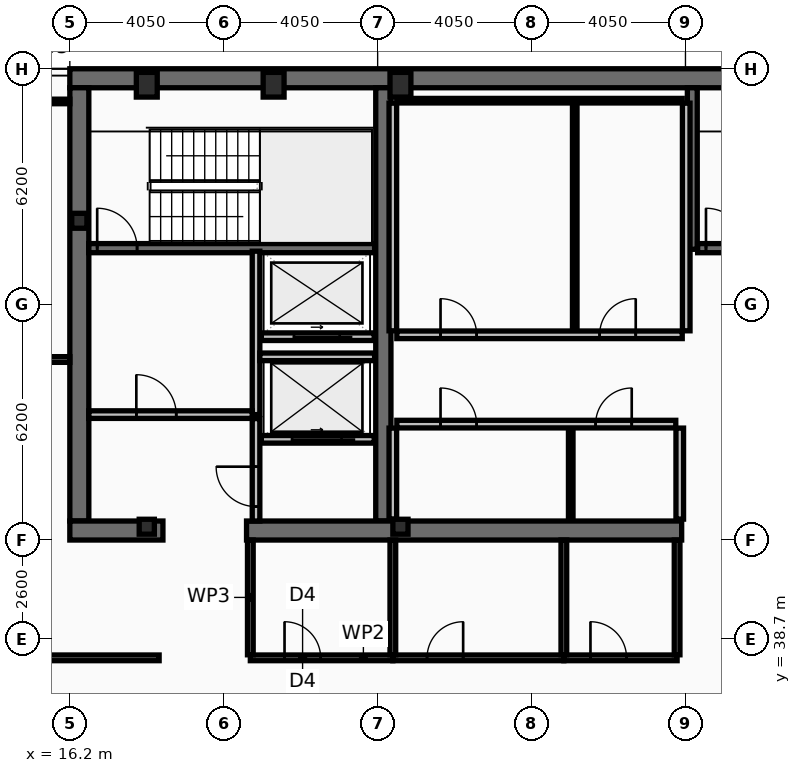
"""IFC4 building model, lengths in metres.
Left out: names, types, materials, properties, quantities, classifications, styles, units other than length and angle.
Written with IfcOpenShell. Run it as: python <this file> out.ifc"""

import sys

from ifc_helpers import new_model, si_unit, direction, frame, frame_2d, origin, origin_2d, place, context, subcontext, project, spatial, rectangle, hollow_rectangle, i_section, extrude, element, fill, save


model = new_model("IFC4")
c1 = context("Model", 3, precision=1e-05, world=origin(), true_north=direction((0.0, 1.0)))
c2 = subcontext(c1, "Body", "Model", "MODEL_VIEW")
j1 = project(units=[si_unit("LENGTHUNIT", "METRE"), si_unit("PLANEANGLEUNIT", "RADIAN")], contexts=[c1])
p1 = place(None, origin())
s1 = spatial("IfcSite", under=j1, at=p1, CompositionType="ELEMENT")
p2 = place(p1, origin())
s2 = spatial("IfcBuilding", under=s1, at=p2, CompositionType="ELEMENT")
p3 = place(p2, frame((0.0, 0.0, 343.4)))
s3 = spatial("IfcBuildingStorey", under=s2, at=p3, CompositionType="ELEMENT", Elevation=343.4)
p4 = place(p3, frame((16.2, 53.45, 0.0), z_axis=(0.0, 0.0, 1.0), x_axis=(1.0, 0.0, 0.0)))
e1 = element("IfcWall", 1, at=p4, inside=s3, PredefinedType="SHEAR", context=c2, shape_type="SweptSolid", body=[
    extrude(rectangle(XDim=40.5, YDim=0.5, at=frame_2d((20.25, 0.0))), origin(), (0.0, 0.0, 1.0), 3.44),
])
p5 = place(p3, frame((16.45, 41.8, 0.0), z_axis=(0.0, 0.0, 1.0), x_axis=(0.0, 1.0, 0.0)))
e2 = element("IfcWall", 2, at=p5, inside=s3, PredefinedType="SHEAR", context=c2, shape_type="SweptSolid", body=[
    extrude(rectangle(XDim=11.4, YDim=0.5, at=frame_2d((5.7, 0.0))), origin(), (0.0, 0.0, 1.0), 3.44),
])
p6 = place(p3, frame((24.45, 41.8, 0.0), z_axis=(0.0, 0.0, 1.0), x_axis=(0.0, 1.0, 0.0)))
e3 = element("IfcWall", 3, at=p6, inside=s3, PredefinedType="SHEAR", context=c2, shape_type="SweptSolid", body=[
    extrude(rectangle(XDim=11.4, YDim=0.4, at=frame_2d((5.7, 0.0))), origin(), (0.0, 0.0, 1.0), 3.44),
])
p7 = place(p3, frame((18.65, 41.55, 0.0), z_axis=(0.0, 0.0, 1.0), x_axis=(-1.0, 0.0, 0.0)))
e4 = element("IfcWall", 4, at=p7, inside=s3, PredefinedType="SHEAR", context=c2, shape_type="SweptSolid", body=[
    extrude(rectangle(XDim=2.45, YDim=0.5, at=frame_2d((1.225, 0.0))), origin(), (0.0, 0.0, 1.0), 3.44),
])
p8 = place(p3, frame((32.3, 41.55, 0.0), z_axis=(0.0, 0.0, 1.0), x_axis=(-1.0, 0.0, 0.0)))
e5 = element("IfcWall", 5, at=p8, inside=s3, PredefinedType="SHEAR", context=c2, shape_type="SweptSolid", body=[
    extrude(rectangle(XDim=11.45, YDim=0.5, at=frame_2d((5.725, 0.0))), origin(), (0.0, 0.0, 1.0), 3.44),
])
p9 = place(p3, frame((32.58, 48.95, 0.0), z_axis=(0.0, 0.0, 1.0), x_axis=(0.0, 1.0, 0.0)))
e6 = element("IfcWall", 6, at=p9, inside=s3, PredefinedType="SHEAR", context=c2, shape_type="SweptSolid", body=[
    extrude(rectangle(XDim=4.25, YDim=0.26, at=frame_2d((2.125, 0.0))), origin(), (0.0, 0.0, 1.0), 3.44),
])
p10 = place(p3, frame((16.7, 48.98, 0.0), z_axis=(0.0, 0.0, 1.0), x_axis=(1.0, 0.0, 0.0)))
e7 = element("IfcWall", 7, at=p10, inside=s3, PredefinedType="SHEAR", context=c2, shape_type="SweptSolid", body=[
    extrude(rectangle(XDim=7.52, YDim=0.24, at=frame_2d((3.76, 0.0))), origin(), (0.0, 0.0, 1.0), 3.44),
])
p11 = place(p10, frame((0.22, 0.0, 0.0)))
e8 = element("IfcOpeningElement", 8, at=p11, cuts=e7, PredefinedType="OPENING", context=c2, shape_type="SweptSolid", body=[
    extrude(rectangle(XDim=1.05, YDim=2.15, at=frame_2d((0.525, 1.075))), frame((0.0, 0.13, 0.0), z_axis=(0.0, -1.0, 0.0), x_axis=(1.0, 0.0, 0.0)), (0.0, 0.0, 1.0), 0.26),
])
p12 = place(p3, frame((32.72, 48.98, 0.0), z_axis=(0.0, 0.0, 1.0), x_axis=(1.0, 0.0, 0.0)))
e9 = element("IfcWall", 9, at=p12, inside=s3, PredefinedType="SHEAR", context=c2, shape_type="SweptSolid", body=[
    extrude(rectangle(XDim=7.56, YDim=0.24, at=frame_2d((3.78, 0.0))), origin(), (0.0, 0.0, 1.0), 3.44),
])
p13 = place(p12, frame((0.22, 0.0, 0.0)))
e10 = element("IfcOpeningElement", 10, at=p13, cuts=e9, PredefinedType="OPENING", context=c2, shape_type="SweptSolid", body=[
    extrude(rectangle(XDim=1.05, YDim=2.15, at=frame_2d((0.525, 1.075))), frame((0.0, 0.13, 0.0), z_axis=(0.0, -1.0, 0.0), x_axis=(1.0, 0.0, 0.0)), (0.0, 0.0, 1.0), 0.26),
])
for number, where, z_axis, x_axis in (
    (11, (18.225, 53.28, 0.0), (0.0, 0.0, 1.0), (1.0, 0.0, 0.0)),
    (12, (21.562, 53.28, 0.0), (0.0, 0.0, 1.0), (1.0, 0.0, 0.0)),
    (13, (24.9, 53.28, 0.0), (0.0, 0.0, 1.0), (1.0, 0.0, 0.0)),
):
    element("IfcColumn", number, at=place(p3, frame(where, z_axis=z_axis, x_axis=x_axis)), inside=s3, PredefinedType="COLUMN", context=c2, shape_type="SweptSolid", body=[
        extrude(hollow_rectangle(XDim=0.55, YDim=0.65, WallThickness=0.04, at=origin_2d()), origin(), (0.0, 0.0, 1.0), 3.6),
    ])
for number, where, z_axis, x_axis in (
    (14, (16.45, 49.7, 0.0), (0.0, 0.0, 1.0), (1.0, 0.0, 0.0)),
    (15, (18.225, 41.65, 0.0), (0.0, 0.0, 1.0), (1.0, 0.0, 0.0)),
    (16, (24.9, 41.65, 0.0), (0.0, 0.0, 1.0), (1.0, 0.0, 0.0)),
):
    element("IfcColumn", number, at=place(p3, frame(where, z_axis=z_axis, x_axis=x_axis)), inside=s3, PredefinedType="COLUMN", context=c2, shape_type="SweptSolid", body=[
        extrude(i_section(OverallWidth=0.399, OverallDepth=0.393, WebThickness=0.023, FlangeThickness=0.037, at=origin_2d()), origin(), (0.0, 0.0, 1.0), 3.6),
    ])
p14 = place(p3, frame((24.21, 43.95, 0.0), z_axis=(0.0, 0.0, 1.0), x_axis=(-1.0, 0.0, 0.0)))
e17 = element("IfcWall", 17, at=p14, inside=s3, PredefinedType="PARTITIONING", context=c2, shape_type="SweptSolid", body=[
    extrude(rectangle(XDim=2.97, YDim=0.2, at=frame_2d((1.485, 0.0))), origin(), (0.0, 0.0, 1.0), 3.44),
])
p15 = place(p14, frame((0.86, 0.0, 0.0)))
e18 = element("IfcOpeningElement", 18, at=p15, cuts=e17, PredefinedType="OPENING", context=c2, shape_type="SweptSolid", body=[
    extrude(rectangle(XDim=1.3, YDim=2.18, at=frame_2d((0.65, 1.09))), frame((0.0, 0.11, 0.0), z_axis=(0.0, -1.0, 0.0), x_axis=(1.0, 0.0, 0.0)), (0.0, 0.0, 1.0), 0.22),
])
p16 = place(p3, frame((24.21, 46.65, 0.0), z_axis=(0.0, 0.0, 1.0), x_axis=(-1.0, 0.0, 0.0)))
e19 = element("IfcWall", 19, at=p16, inside=s3, PredefinedType="PARTITIONING", context=c2, shape_type="SweptSolid", body=[
    extrude(rectangle(XDim=2.97, YDim=0.2, at=frame_2d((1.485, 0.0))), origin(), (0.0, 0.0, 1.0), 3.44),
])
p17 = place(p16, frame((0.91, 0.0, 0.0)))
e20 = element("IfcOpeningElement", 20, at=p17, cuts=e19, PredefinedType="OPENING", context=c2, shape_type="SweptSolid", body=[
    extrude(rectangle(XDim=1.2, YDim=2.18, at=frame_2d((0.6, 1.09))), frame((0.0, 0.11, 0.0), z_axis=(0.0, -1.0, 0.0), x_axis=(1.0, 0.0, 0.0)), (0.0, 0.0, 1.0), 0.22),
])
p18 = place(p3, frame((21.1, 44.6, 0.0), z_axis=(0.0, 0.0, 1.0), x_axis=(0.0, 1.0, 0.0)))
e21 = element("IfcWall", 21, at=p18, inside=s3, PredefinedType="PARTITIONING", context=c2, shape_type="SweptSolid", body=[
    extrude(rectangle(XDim=4.3, YDim=0.2, at=frame_2d((2.15, 0.0))), origin(), (0.0, 0.0, 1.0), 3.44),
])
p19 = place(p3, frame((16.7, 44.6, 0.0), z_axis=(0.0, 0.0, 1.0), x_axis=(1.0, 0.0, 0.0)))
e22 = element("IfcWall", 22, at=p19, inside=s3, PredefinedType="PARTITIONING", context=c2, shape_type="SweptSolid", body=[
    extrude(rectangle(XDim=4.3, YDim=0.2, at=frame_2d((2.15, 0.0))), origin(), (0.0, 0.0, 1.0), 3.44),
])
p20 = place(p19, frame((1.25, 0.0, 0.0)))
e23 = element("IfcOpeningElement", 23, at=p20, cuts=e22, PredefinedType="OPENING", context=c2, shape_type="SweptSolid", body=[
    extrude(rectangle(XDim=1.05, YDim=2.15, at=frame_2d((0.525, 1.075))), frame((0.0, 0.11, 0.0), z_axis=(0.0, -1.0, 0.0), x_axis=(1.0, 0.0, 0.0)), (0.0, 0.0, 1.0), 0.22),
])
p21 = place(p3, frame((21.2, 46.12, 0.0), z_axis=(0.0, 0.0, 1.0), x_axis=(1.0, 0.0, 0.0)))
e24 = element("IfcWall", 24, at=p21, inside=s3, PredefinedType="PARTITIONING", context=c2, shape_type="SweptSolid", body=[
    extrude(rectangle(XDim=3.02, YDim=0.2, at=frame_2d((1.51, 0.0))), origin(), (0.0, 0.0, 1.0), 3.44),
])
p22 = place(p3, frame((21.1, 41.8, 0.0), z_axis=(0.0, 0.0, 1.0), x_axis=(0.0, 1.0, 0.0)))
e25 = element("IfcWall", 25, at=p22, inside=s3, PredefinedType="PARTITIONING", context=c2, shape_type="SweptSolid", body=[
    extrude(rectangle(XDim=2.695, YDim=0.2, at=frame_2d((1.348, 0.0))), origin(), (0.0, 0.0, 1.0), 3.44),
])
p23 = place(p22, frame((0.38, 0.0, 0.0)))
e26 = element("IfcOpeningElement", 26, at=p23, cuts=e25, PredefinedType="OPENING", context=c2, shape_type="SweptSolid", body=[
    extrude(rectangle(XDim=1.05, YDim=2.15, at=frame_2d((0.525, 1.075))), frame((0.0, 0.11, 0.0), z_axis=(0.0, -1.0, 0.0), x_axis=(1.0, 0.0, 0.0)), (0.0, 0.0, 1.0), 0.22),
])
for number, where, z_axis, x_axis in (
    (27, (24.7, 46.805, 0.0), (0.0, 0.0, 1.0), (0.0, 1.0, 0.0)),
    (28, (32.42, 46.805, 0.0), (0.0, 0.0, 1.0), (0.0, 1.0, 0.0)),
):
    element("IfcWall", number, at=place(p3, frame(where, z_axis=z_axis, x_axis=x_axis)), inside=s3, PredefinedType="PARTITIONING", context=c2, shape_type="SweptSolid", body=[
        extrude(rectangle(XDim=5.99, YDim=0.2, at=frame_2d((2.995, 0.0))), origin(), (0.0, 0.0, 1.0), 3.44),
    ])
p24 = place(p3, frame((24.805, 52.86, 0.0), z_axis=(0.0, 0.0, 1.0), x_axis=(1.0, 0.0, 0.0)))
e29 = element("IfcWall", 29, at=p24, inside=s3, PredefinedType="PARTITIONING", context=c2, shape_type="SweptSolid", body=[
    extrude(rectangle(XDim=7.51, YDim=0.12, at=frame_2d((3.755, 0.0))), origin(), (0.0, 0.0, 1.0), 3.44),
])
p25 = place(p3, frame((29.486, 46.805, 0.0), z_axis=(0.0, 0.0, 1.0), x_axis=(0.0, 1.0, 0.0)))
e30 = element("IfcWall", 30, at=p25, inside=s3, PredefinedType="PARTITIONING", context=c2, shape_type="SweptSolid", body=[
    extrude(rectangle(XDim=5.99, YDim=0.12, at=frame_2d((2.995, 0.0))), origin(), (0.0, 0.0, 1.0), 3.44),
])
p26 = place(p3, frame((24.805, 46.7, 0.0), z_axis=(0.0, 0.0, 1.0), x_axis=(1.0, 0.0, 0.0)))
e31 = element("IfcWall", 31, at=p26, inside=s3, PredefinedType="PARTITIONING", context=c2, shape_type="SweptSolid", body=[
    extrude(rectangle(XDim=7.51, YDim=0.2, at=frame_2d((3.755, 0.0))), origin(), (0.0, 0.0, 1.0), 3.44),
])
p27 = place(p26, frame((1.15, 0.0, 0.0)))
e32 = element("IfcOpeningElement", 32, at=p27, cuts=e31, PredefinedType="OPENING", context=c2, shape_type="SweptSolid", body=[
    extrude(rectangle(XDim=0.95, YDim=2.1, at=frame_2d((0.475, 1.05))), frame((0.0, 0.11, 0.0), z_axis=(0.0, -1.0, 0.0), x_axis=(1.0, 0.0, 0.0)), (0.0, 0.0, 1.0), 0.22),
])
p28 = place(p26, frame((5.336, 0.0, 0.0)))
e33 = element("IfcOpeningElement", 33, at=p28, cuts=e31, PredefinedType="OPENING", context=c2, shape_type="SweptSolid", body=[
    extrude(rectangle(XDim=0.95, YDim=2.1, at=frame_2d((0.475, 1.05))), frame((0.0, 0.11, 0.0), z_axis=(0.0, -1.0, 0.0), x_axis=(1.0, 0.0, 0.0)), (0.0, 0.0, 1.0), 0.22),
])
for number, where, z_axis, x_axis in (
    (34, (24.7, 41.85, 0.0), (0.0, 0.0, 1.0), (0.0, 1.0, 0.0)),
    (35, (32.25, 41.85, 0.0), (0.0, 0.0, 1.0), (0.0, 1.0, 0.0)),
):
    element("IfcWall", number, at=place(p3, frame(where, z_axis=z_axis, x_axis=x_axis)), inside=s3, PredefinedType="PARTITIONING", context=c2, shape_type="SweptSolid", body=[
        extrude(rectangle(XDim=2.395, YDim=0.2, at=frame_2d((1.198, 0.0))), origin(), (0.0, 0.0, 1.0), 3.44),
    ])
p29 = place(p3, frame((29.381, 41.85, 0.0), z_axis=(0.0, 0.0, 1.0), x_axis=(0.0, 1.0, 0.0)))
e36 = element("IfcWall", 36, at=p29, inside=s3, PredefinedType="PARTITIONING", context=c2, shape_type="SweptSolid", body=[
    extrude(rectangle(XDim=2.395, YDim=0.12, at=frame_2d((1.198, 0.0))), origin(), (0.0, 0.0, 1.0), 3.44),
])
p30 = place(p3, frame((24.805, 44.35, 0.0), z_axis=(0.0, 0.0, 1.0), x_axis=(1.0, 0.0, 0.0)))
e37 = element("IfcWall", 37, at=p30, inside=s3, PredefinedType="PARTITIONING", context=c2, shape_type="SweptSolid", body=[
    extrude(rectangle(XDim=7.34, YDim=0.2, at=frame_2d((3.67, 0.0))), origin(), (0.0, 0.0, 1.0), 3.44),
])
p31 = place(p30, frame((1.15, 0.0, 0.0)))
e38 = element("IfcOpeningElement", 38, at=p31, cuts=e37, PredefinedType="OPENING", context=c2, shape_type="SweptSolid", body=[
    extrude(rectangle(XDim=0.95, YDim=2.1, at=frame_2d((0.475, 1.05))), frame((0.0, 0.11, 0.0), z_axis=(0.0, -1.0, 0.0), x_axis=(1.0, 0.0, 0.0)), (0.0, 0.0, 1.0), 0.22),
])
p32 = place(p30, frame((5.231, 0.0, 0.0)))
e39 = element("IfcOpeningElement", 39, at=p32, cuts=e37, PredefinedType="OPENING", context=c2, shape_type="SweptSolid", body=[
    extrude(rectangle(XDim=0.95, YDim=2.1, at=frame_2d((0.475, 1.05))), frame((0.0, 0.11, 0.0), z_axis=(0.0, -1.0, 0.0), x_axis=(1.0, 0.0, 0.0)), (0.0, 0.0, 1.0), 0.22),
])
p33 = place(p3, frame((20.95, 38.2, 0.0), z_axis=(0.0, 0.0, 1.0), x_axis=(1.0, 0.0, 0.0)))
e40 = element("IfcWall", 40, at=p33, inside=s3, PredefinedType="PARTITIONING", context=c2, shape_type="SweptSolid", body=[
    extrude(rectangle(XDim=3.75, YDim=0.15, at=frame_2d((1.875, 0.0))), origin(), (0.0, 0.0, 1.0), 2.83),
])
p34 = place(p33, frame((0.9, 0.0, 0.0)))
e41 = element("IfcOpeningElement", 41, at=p34, cuts=e40, PredefinedType="OPENING", context=c2, shape_type="SweptSolid", body=[
    extrude(rectangle(XDim=0.95, YDim=2.05, at=frame_2d((0.475, 1.025))), frame((0.0, 0.085, 0.0), z_axis=(0.0, -1.0, 0.0), x_axis=(1.0, 0.0, 0.0)), (0.0, 0.0, 1.0), 0.17),
])
p35 = place(p3, frame((24.7, 38.2, 0.0), z_axis=(0.0, 0.0, 1.0), x_axis=(1.0, 0.0, 0.0)))
e42 = element("IfcWall", 42, at=p35, inside=s3, PredefinedType="PARTITIONING", context=c2, shape_type="SweptSolid", body=[
    extrude(rectangle(XDim=4.5, YDim=0.15, at=frame_2d((2.25, 0.0))), origin(), (0.0, 0.0, 1.0), 2.83),
])
p36 = place(p35, frame((0.9, 0.0, 0.0)))
e43 = element("IfcOpeningElement", 43, at=p36, cuts=e42, PredefinedType="OPENING", context=c2, shape_type="SweptSolid", body=[
    extrude(rectangle(XDim=0.95, YDim=2.05, at=frame_2d((0.475, 1.025))), frame((0.0, 0.085, 0.0), z_axis=(0.0, -1.0, 0.0), x_axis=(1.0, 0.0, 0.0)), (0.0, 0.0, 1.0), 0.17),
])
p37 = place(p3, frame((29.2, 38.2, 0.0), z_axis=(0.0, 0.0, 1.0), x_axis=(1.0, 0.0, 0.0)))
e44 = element("IfcWall", 44, at=p37, inside=s3, PredefinedType="PARTITIONING", context=c2, shape_type="SweptSolid", body=[
    extrude(rectangle(XDim=2.98, YDim=0.15, at=frame_2d((1.49, 0.0))), origin(), (0.0, 0.0, 1.0), 3.44),
])
p38 = place(p37, frame((0.7, 0.0, 0.0)))
e45 = element("IfcOpeningElement", 45, at=p38, cuts=e44, PredefinedType="OPENING", context=c2, shape_type="SweptSolid", body=[
    extrude(rectangle(XDim=0.95, YDim=2.05, at=frame_2d((0.475, 1.025))), frame((0.0, 0.085, 0.0), z_axis=(0.0, -1.0, 0.0), x_axis=(1.0, 0.0, 0.0)), (0.0, 0.0, 1.0), 0.17),
])
p39 = place(p3, frame((20.95, 38.28, 0.0), z_axis=(0.0, 0.0, 1.0), x_axis=(0.0, 1.0, 0.0)))
e46 = element("IfcWall", 46, at=p39, inside=s3, PredefinedType="PARTITIONING", context=c2, shape_type="SweptSolid", body=[
    extrude(rectangle(XDim=3.02, YDim=0.15, at=frame_2d((1.51, 0.0))), origin(), (0.0, 0.0, 1.0), 3.44),
])
p40 = place(p3, frame((24.7, 38.28, 0.0), z_axis=(0.0, 0.0, 1.0), x_axis=(0.0, 1.0, 0.0)))
e47 = element("IfcWall", 47, at=p40, inside=s3, PredefinedType="PARTITIONING", context=c2, shape_type="SweptSolid", body=[
    extrude(rectangle(XDim=3.02, YDim=0.15, at=frame_2d((1.51, 0.0))), origin(), (0.0, 0.0, 1.0), 2.83),
])
for number, where, z_axis, x_axis in (
    (48, (29.2, 38.28, 0.0), (0.0, 0.0, 1.0), (0.0, 1.0, 0.0)),
    (49, (32.18, 38.28, 0.0), (0.0, 0.0, 1.0), (0.0, 1.0, 0.0)),
):
    element("IfcWall", number, at=place(p3, frame(where, z_axis=z_axis, x_axis=x_axis)), inside=s3, PredefinedType="PARTITIONING", context=c2, shape_type="SweptSolid", body=[
        extrude(rectangle(XDim=3.02, YDim=0.15, at=frame_2d((1.51, 0.0))), origin(), (0.0, 0.0, 1.0), 3.44),
    ])
p41 = place(p3, frame((12.03, 38.2, 0.0), z_axis=(0.0, 0.0, 1.0), x_axis=(1.0, 0.0, 0.0)))
e50 = element("IfcWall", 50, at=p41, inside=s3, PredefinedType="PARTITIONING", context=c2, shape_type="SweptSolid", body=[
    extrude(rectangle(XDim=6.52, YDim=0.15, at=frame_2d((3.26, 0.0))), origin(), (0.0, 0.0, 1.0), 2.83),
])
p42 = place(p41, frame((2.32, 0.0, 0.0)))
e51 = element("IfcOpeningElement", 51, at=p42, cuts=e50, PredefinedType="OPENING", context=c2, shape_type="SweptSolid", body=[
    extrude(rectangle(XDim=0.95, YDim=2.05, at=frame_2d((0.475, 1.025))), frame((0.0, 0.085, 0.0), z_axis=(0.0, -1.0, 0.0), x_axis=(1.0, 0.0, 0.0)), (0.0, 0.0, 1.0), 0.17),
])
p43 = place(p3, frame((12.095, 46.05, 0.0), z_axis=(0.0, 0.0, 1.0), x_axis=(1.0, 0.0, 0.0)))
e52 = element("IfcWall", 52, at=p43, inside=s3, PredefinedType="PARTITIONING", context=c2, shape_type="SweptSolid", body=[
    extrude(rectangle(XDim=4.105, YDim=0.15, at=frame_2d((2.052, 0.0))), origin(), (0.0, 0.0, 1.0), 2.88),
])
p44 = place(p43, frame((2.32, 0.0, 0.0)))
e53 = element("IfcOpeningElement", 53, at=p44, cuts=e52, PredefinedType="OPENING", context=c2, shape_type="SweptSolid", body=[
    extrude(rectangle(XDim=0.9, YDim=2.05, at=frame_2d((0.45, 1.025))), frame((0.0, 0.085, 0.0), z_axis=(0.0, -1.0, 0.0), x_axis=(1.0, 0.0, 0.0)), (0.0, 0.0, 1.0), 0.17),
])
p45 = place(p3, frame((12.095, 52.84, 0.0), z_axis=(0.0, 0.0, 1.0), x_axis=(1.0, 0.0, 0.0)))
e54 = element("IfcWall", 54, at=p45, inside=s3, PredefinedType="PARTITIONING", context=c2, shape_type="SweptSolid", body=[
    extrude(rectangle(XDim=4.105, YDim=0.12, at=frame_2d((2.052, 0.0))), origin(), (0.0, 0.0, 1.0), 3.44),
])
p46 = place(p11, origin())
e55 = element("IfcDoor", 55, at=p46, inside=s3, OperationType="SINGLE_SWING_LEFT", PredefinedType="DOOR", context=c2, shape_type="SweptSolid", body=[
    extrude(rectangle(XDim=1.05, YDim=2.15, at=frame_2d((0.525, 1.075))), frame((0.0, 0.025, 0.0), z_axis=(0.0, -1.0, 0.0), x_axis=(1.0, 0.0, 0.0)), (0.0, 0.0, 1.0), 0.05),
])
fill(e8, e55)
p47 = place(p13, origin())
e56 = element("IfcDoor", 56, at=p47, inside=s3, OperationType="SINGLE_SWING_LEFT", PredefinedType="DOOR", context=c2, shape_type="SweptSolid", body=[
    extrude(rectangle(XDim=1.05, YDim=2.15, at=frame_2d((0.525, 1.075))), frame((0.0, 0.025, 0.0), z_axis=(0.0, -1.0, 0.0), x_axis=(1.0, 0.0, 0.0)), (0.0, 0.0, 1.0), 0.05),
])
fill(e10, e56)
p48 = place(p15, origin())
e57 = element("IfcDoor", 57, at=p48, inside=s3, OperationType="SLIDING_TO_LEFT", PredefinedType="DOOR", context=c2, shape_type="SweptSolid", body=[
    extrude(rectangle(XDim=1.3, YDim=2.18, at=frame_2d((0.65, 1.09))), frame((0.0, 0.025, 0.0), z_axis=(0.0, -1.0, 0.0), x_axis=(1.0, 0.0, 0.0)), (0.0, 0.0, 1.0), 0.05),
])
fill(e18, e57)
p49 = place(p17, origin())
e58 = element("IfcDoor", 58, at=p49, inside=s3, OperationType="SLIDING_TO_LEFT", PredefinedType="DOOR", context=c2, shape_type="SweptSolid", body=[
    extrude(rectangle(XDim=1.2, YDim=2.18, at=frame_2d((0.6, 1.09))), frame((0.0, 0.025, 0.0), z_axis=(0.0, -1.0, 0.0), x_axis=(1.0, 0.0, 0.0)), (0.0, 0.0, 1.0), 0.05),
])
fill(e20, e58)
p50 = place(p20, origin())
e59 = element("IfcDoor", 59, at=p50, inside=s3, OperationType="SINGLE_SWING_LEFT", PredefinedType="DOOR", context=c2, shape_type="SweptSolid", body=[
    extrude(rectangle(XDim=1.05, YDim=2.15, at=frame_2d((0.525, 1.075))), frame((0.0, 0.025, 0.0), z_axis=(0.0, -1.0, 0.0), x_axis=(1.0, 0.0, 0.0)), (0.0, 0.0, 1.0), 0.05),
])
fill(e23, e59)
p51 = place(p23, origin())
e60 = element("IfcDoor", 60, at=p51, inside=s3, OperationType="SINGLE_SWING_RIGHT", PredefinedType="DOOR", context=c2, shape_type="SweptSolid", body=[
    extrude(rectangle(XDim=1.05, YDim=2.15, at=frame_2d((0.525, 1.075))), frame((0.0, 0.025, 0.0), z_axis=(0.0, -1.0, 0.0), x_axis=(1.0, 0.0, 0.0)), (0.0, 0.0, 1.0), 0.05),
])
fill(e26, e60)
p52 = place(p27, origin())
e61 = element("IfcDoor", 61, at=p52, inside=s3, OperationType="SINGLE_SWING_LEFT", PredefinedType="DOOR", context=c2, shape_type="SweptSolid", body=[
    extrude(rectangle(XDim=0.95, YDim=2.1, at=frame_2d((0.475, 1.05))), frame((0.0, 0.025, 0.0), z_axis=(0.0, -1.0, 0.0), x_axis=(1.0, 0.0, 0.0)), (0.0, 0.0, 1.0), 0.05),
])
fill(e32, e61)
p53 = place(p28, origin())
e62 = element("IfcDoor", 62, at=p53, inside=s3, OperationType="SINGLE_SWING_RIGHT", PredefinedType="DOOR", context=c2, shape_type="SweptSolid", body=[
    extrude(rectangle(XDim=0.95, YDim=2.1, at=frame_2d((0.475, 1.05))), frame((0.0, 0.025, 0.0), z_axis=(0.0, -1.0, 0.0), x_axis=(1.0, 0.0, 0.0)), (0.0, 0.0, 1.0), 0.05),
])
fill(e33, e62)
p54 = place(p31, origin())
e63 = element("IfcDoor", 63, at=p54, inside=s3, OperationType="SINGLE_SWING_LEFT", PredefinedType="DOOR", context=c2, shape_type="SweptSolid", body=[
    extrude(rectangle(XDim=0.95, YDim=2.1, at=frame_2d((0.475, 1.05))), frame((0.0, 0.025, 0.0), z_axis=(0.0, -1.0, 0.0), x_axis=(1.0, 0.0, 0.0)), (0.0, 0.0, 1.0), 0.05),
])
fill(e38, e63)
p55 = place(p32, origin())
e64 = element("IfcDoor", 64, at=p55, inside=s3, OperationType="SINGLE_SWING_RIGHT", PredefinedType="DOOR", context=c2, shape_type="SweptSolid", body=[
    extrude(rectangle(XDim=0.95, YDim=2.1, at=frame_2d((0.475, 1.05))), frame((0.0, 0.025, 0.0), z_axis=(0.0, -1.0, 0.0), x_axis=(1.0, 0.0, 0.0)), (0.0, 0.0, 1.0), 0.05),
])
fill(e39, e64)
p56 = place(p34, origin())
e65 = element("IfcDoor", 65, at=p56, inside=s3, OperationType="SINGLE_SWING_LEFT", PredefinedType="DOOR", context=c2, shape_type="SweptSolid", body=[
    extrude(rectangle(XDim=0.95, YDim=2.05, at=frame_2d((0.475, 1.025))), frame((0.0, 0.025, 0.0), z_axis=(0.0, -1.0, 0.0), x_axis=(1.0, 0.0, 0.0)), (0.0, 0.0, 1.0), 0.05),
])
fill(e41, e65)
p57 = place(p36, origin())
e66 = element("IfcDoor", 66, at=p57, inside=s3, OperationType="SINGLE_SWING_RIGHT", PredefinedType="DOOR", context=c2, shape_type="SweptSolid", body=[
    extrude(rectangle(XDim=0.95, YDim=2.05, at=frame_2d((0.475, 1.025))), frame((0.0, 0.025, 0.0), z_axis=(0.0, -1.0, 0.0), x_axis=(1.0, 0.0, 0.0)), (0.0, 0.0, 1.0), 0.05),
])
fill(e43, e66)
p58 = place(p38, origin())
e67 = element("IfcDoor", 67, at=p58, inside=s3, OperationType="SINGLE_SWING_LEFT", PredefinedType="DOOR", context=c2, shape_type="SweptSolid", body=[
    extrude(rectangle(XDim=0.95, YDim=2.05, at=frame_2d((0.475, 1.025))), frame((0.0, 0.025, 0.0), z_axis=(0.0, -1.0, 0.0), x_axis=(1.0, 0.0, 0.0)), (0.0, 0.0, 1.0), 0.05),
])
fill(e45, e67)
save(model, sys.argv[1])
